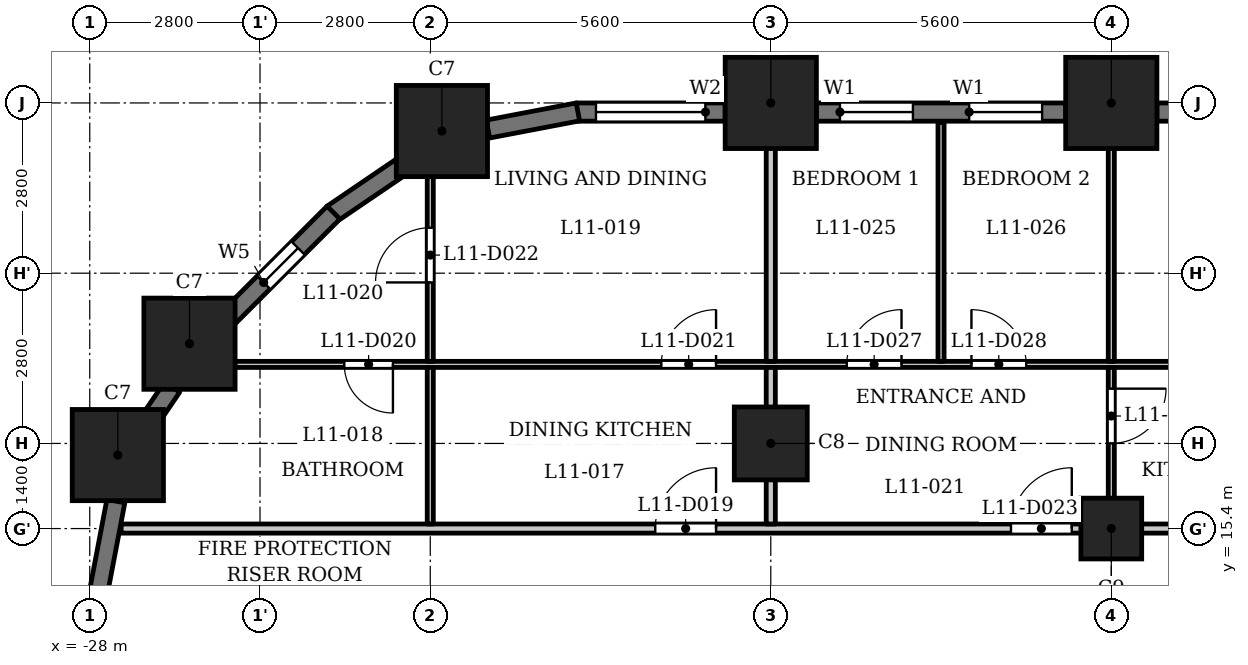
"""IFC4 building model, lengths in metres.
Left out: names, types, materials, properties, quantities, classifications, styles, units other than length and angle.
Written with IfcOpenShell. Run it as: python <this file> out.ifc"""

import sys

from ifc_helpers import new_model, si_unit, direction, frame, frame_2d, origin, origin_2d, place, context, subcontext, project, spatial, rectangle, extrude, element, fill, save


model = new_model("IFC4")
c1 = context("Model", 3, precision=1e-05, world=origin(), true_north=direction((0.0, 1.0)))
c2 = subcontext(c1, "Body", "Model", "MODEL_VIEW")
j1 = project(units=[si_unit("LENGTHUNIT", "METRE"), si_unit("PLANEANGLEUNIT", "RADIAN")], contexts=[c1])
p1 = place(None, origin())
s1 = spatial("IfcSite", under=j1, at=p1, CompositionType="ELEMENT")
p2 = place(p1, origin())
s2 = spatial("IfcBuilding", under=s1, at=p2, CompositionType="ELEMENT")
p3 = place(p2, frame((0.0, 0.0, 48.0)))
s3 = spatial("IfcBuildingStorey", under=s2, at=p3, CompositionType="ELEMENT", Elevation=48.0)
for number, where, z_axis, x_axis in (
    (1, (-11.2, 22.4, 0.0), (0.0, 0.0, 1.0), (1.0, 0.0, 0.0)),
    (2, (-16.8, 22.4, 0.0), (0.0, 0.0, 1.0), (1.0, 0.0, 0.0)),
    (3, (-22.209, 21.938, 0.0), (0.0, 0.0, 1.0), (1.0, 0.0, 0.0)),
    (4, (-26.36, 18.44, 0.0), (0.0, 0.0, 1.0), (1.0, 0.0, 0.0)),
    (5, (-27.538, 16.609, 0.0), (0.0, 0.0, 1.0), (1.0, 0.0, 0.0)),
):
    element("IfcColumn", number, at=place(p3, frame(where, z_axis=z_axis, x_axis=x_axis)), inside=s3, PredefinedType="COLUMN", context=c2, shape_type="SweptSolid", body=[
        extrude(rectangle(XDim=1.5, YDim=1.5, at=origin_2d()), origin(), (0.0, 0.0, 1.0), 3.5),
    ])
p4 = place(p3, frame((-16.8, 16.8, 0.0), z_axis=(0.0, 0.0, 1.0), x_axis=(1.0, 0.0, 0.0)))
e6 = element("IfcColumn", 6, at=p4, inside=s3, PredefinedType="COLUMN", context=c2, shape_type="SweptSolid", body=[
    extrude(rectangle(XDim=1.2, YDim=1.2, at=origin_2d()), origin(), (0.0, 0.0, 1.0), 3.5),
])
p5 = place(p3, frame((-11.2, 15.4, 0.0), z_axis=(0.0, 0.0, 1.0), x_axis=(1.0, 0.0, 0.0)))
e7 = element("IfcColumn", 7, at=p5, inside=s3, PredefinedType="COLUMN", context=c2, shape_type="SweptSolid", body=[
    extrude(rectangle(XDim=1.0, YDim=1.0, at=origin_2d()), origin(), (0.0, 0.0, 1.0), 3.5),
])
p6 = place(p3, frame((-6.35, 22.25, 0.0), z_axis=(0.0, 0.0, 1.0), x_axis=(-1.0, 0.0, 0.0)))
e8 = element("IfcWall", 8, at=p6, inside=s3, PredefinedType="SOLIDWALL", context=c2, shape_type="SweptSolid", body=[
    extrude(rectangle(XDim=4.1, YDim=0.3, at=frame_2d((2.05, 0.0))), origin(), (0.0, 0.0, 1.0), 2.35),
])
p7 = place(p6, frame((0.75, 0.0, 0.9)))
e9 = element("IfcOpeningElement", 9, at=p7, cuts=e8, PredefinedType="OPENING", context=c2, shape_type="SweptSolid", body=[
    extrude(rectangle(XDim=2.6, YDim=1.25, at=frame_2d((1.3, 0.625))), frame((0.0, 0.16, 0.0), z_axis=(0.0, -1.0, 0.0), x_axis=(1.0, 0.0, 0.0)), (0.0, 0.0, 1.0), 0.32),
])
p8 = place(p3, frame((-11.95, 22.25, 0.0), z_axis=(0.0, 0.0, 1.0), x_axis=(-1.0, 0.0, 0.0)))
e10 = element("IfcWall", 10, at=p8, inside=s3, PredefinedType="SOLIDWALL", context=c2, shape_type="SweptSolid", body=[
    extrude(rectangle(XDim=4.1, YDim=0.3, at=frame_2d((2.05, 0.0))), origin(), (0.0, 0.0, 1.0), 2.35),
])
p9 = place(p8, frame((0.387, 0.0, 0.6)))
e11 = element("IfcOpeningElement", 11, at=p9, cuts=e10, PredefinedType="OPENING", context=c2, shape_type="SweptSolid", body=[
    extrude(rectangle(XDim=1.2, YDim=1.55, at=frame_2d((0.6, 0.775))), frame((0.0, 0.16, 0.0), z_axis=(0.0, -1.0, 0.0), x_axis=(1.0, 0.0, 0.0)), (0.0, 0.0, 1.0), 0.32),
])
p10 = place(p8, frame((2.512, 0.0, 0.6)))
e12 = element("IfcOpeningElement", 12, at=p10, cuts=e10, PredefinedType="OPENING", context=c2, shape_type="SweptSolid", body=[
    extrude(rectangle(XDim=1.2, YDim=1.55, at=frame_2d((0.6, 0.775))), frame((0.0, 0.16, 0.0), z_axis=(0.0, -1.0, 0.0), x_axis=(1.0, 0.0, 0.0)), (0.0, 0.0, 1.0), 0.32),
])
p11 = place(p3, frame((-17.55, 22.25, 0.0), z_axis=(0.0, 0.0, 1.0), x_axis=(-1.0, 0.0, 0.0)))
e13 = element("IfcWall", 13, at=p11, inside=s3, PredefinedType="SOLIDWALL", context=c2, shape_type="SweptSolid", body=[
    extrude(rectangle(XDim=2.45, YDim=0.3, at=frame_2d((1.225, 0.0))), origin(), (0.0, 0.0, 1.0), 2.35),
])
p12 = place(p11, frame((0.325, 0.0, 0.9)))
e14 = element("IfcOpeningElement", 14, at=p12, cuts=e13, PredefinedType="OPENING", context=c2, shape_type="SweptSolid", body=[
    extrude(rectangle(XDim=1.8, YDim=1.25, at=frame_2d((0.9, 0.625))), frame((0.0, 0.16, 0.0), z_axis=(0.0, -1.0, 0.0), x_axis=(1.0, 0.0, 0.0)), (0.0, 0.0, 1.0), 0.32),
])
for number, where, z_axis, x_axis in (
    (15, (-19.972, 22.253, 0.0), (0.0, 0.0, 1.0), (-0.982, -0.187, 0.0)),
    (16, (-22.767, 21.426, 0.0), (0.0, 0.0, 1.0), (-0.827, -0.562, 0.0)),
):
    element("IfcWall", number, at=place(p3, frame(where, z_axis=z_axis, x_axis=x_axis)), inside=s3, PredefinedType="SOLIDWALL", context=c2, shape_type="SweptSolid", body=[
        extrude(rectangle(XDim=1.506, YDim=0.3, at=frame_2d((0.753, 0.0))), origin(), (0.0, 0.0, 1.0), 2.35),
    ])
p13 = place(p3, frame((-23.991, 20.597, 0.0), z_axis=(0.0, 0.0, 1.0), x_axis=(-0.707106781187, -0.707106781187, 0.0)))
e17 = element("IfcWall", 17, at=p13, inside=s3, PredefinedType="SOLIDWALL", context=c2, shape_type="SweptSolid", body=[
    extrude(rectangle(XDim=2.45, YDim=0.3, at=frame_2d((1.225, 0.0))), origin(), (0.0, 0.0, 1.0), 2.35),
])
p14 = place(p13, frame((0.825, 0.0, 0.6)))
e18 = element("IfcOpeningElement", 18, at=p14, cuts=e17, PredefinedType="OPENING", context=c2, shape_type="SweptSolid", body=[
    extrude(rectangle(XDim=0.8, YDim=1.55, at=frame_2d((0.4, 0.775))), frame((0.0, 0.16, 0.0), z_axis=(0.0, -1.0, 0.0), x_axis=(1.0, 0.0, 0.0)), (0.0, 0.0, 1.0), 0.32),
])
p15 = place(p3, frame((-26.645, 17.727, 0.0), z_axis=(0.0, 0.0, 1.0), x_axis=(-0.562083182981, -0.827080706709, 0.0)))
e19 = element("IfcWall", 19, at=p15, inside=s3, PredefinedType="SOLIDWALL", context=c2, shape_type="SweptSolid", body=[
    extrude(rectangle(XDim=0.677, YDim=0.3, at=frame_2d((0.339, 0.0))), origin(), (0.0, 0.0, 1.0), 3.2),
])
p16 = place(p3, frame((-27.571, 15.851, 0.0), z_axis=(0.0, 0.0, 1.0), x_axis=(-0.187223837635, -0.982317277982, 0.0)))
e20 = element("IfcWall", 20, at=p16, inside=s3, PredefinedType="SOLIDWALL", context=c2, shape_type="SweptSolid", body=[
    extrude(rectangle(XDim=1.506, YDim=0.3, at=frame_2d((0.753, 0.0))), origin(), (0.0, 0.0, 1.0), 2.35),
])
p17 = place(p3, frame((-27.484, 15.4, 0.0), z_axis=(0.0, 0.0, 1.0), x_axis=(1.0, 0.0, 0.0)))
e21 = element("IfcWall", 21, at=p17, inside=s3, PredefinedType="PARTITIONING", context=c2, shape_type="SweptSolid", body=[
    extrude(rectangle(XDim=54.968, YDim=0.15, at=frame_2d((27.484, 0.0))), origin(), (0.0, 0.0, 1.0), 3.2),
])
p18 = place(p17, frame((8.784, 0.0, 0.0)))
e22 = element("IfcOpeningElement", 22, at=p18, cuts=e21, PredefinedType="OPENING", context=c2, shape_type="SweptSolid", body=[
    extrude(rectangle(XDim=1.0, YDim=2.1, at=frame_2d((0.5, 1.05))), frame((0.0, 0.085, 0.0), z_axis=(0.0, -1.0, 0.0), x_axis=(1.0, 0.0, 0.0)), (0.0, 0.0, 1.0), 0.17),
])
p19 = place(p17, frame((14.634, 0.0, 0.0)))
e23 = element("IfcOpeningElement", 23, at=p19, cuts=e21, PredefinedType="OPENING", context=c2, shape_type="SweptSolid", body=[
    extrude(rectangle(XDim=1.0, YDim=2.1, at=frame_2d((0.5, 1.05))), frame((0.0, 0.085, 0.0), z_axis=(0.0, -1.0, 0.0), x_axis=(1.0, 0.0, 0.0)), (0.0, 0.0, 1.0), 0.17),
])
p20 = place(p17, frame((25.834, 0.0, 0.0)))
e24 = element("IfcOpeningElement", 24, at=p20, cuts=e21, PredefinedType="OPENING", context=c2, shape_type="SweptSolid", body=[
    extrude(rectangle(XDim=1.0, YDim=2.1, at=frame_2d((0.5, 1.05))), frame((0.0, 0.085, 0.0), z_axis=(0.0, -1.0, 0.0), x_axis=(1.0, 0.0, 0.0)), (0.0, 0.0, 1.0), 0.17),
])
p21 = place(p17, frame((30.184, 0.0, 0.0)))
e25 = element("IfcOpeningElement", 25, at=p21, cuts=e21, PredefinedType="OPENING", context=c2, shape_type="SweptSolid", body=[
    extrude(rectangle(XDim=1.0, YDim=2.1, at=frame_2d((0.5, 1.05))), frame((0.0, 0.085, 0.0), z_axis=(0.0, -1.0, 0.0), x_axis=(1.0, 0.0, 0.0)), (0.0, 0.0, 1.0), 0.17),
])
p22 = place(p17, frame((37.034, 0.0, 0.0)))
e26 = element("IfcOpeningElement", 26, at=p22, cuts=e21, PredefinedType="OPENING", context=c2, shape_type="SweptSolid", body=[
    extrude(rectangle(XDim=1.0, YDim=2.1, at=frame_2d((0.5, 1.05))), frame((0.0, 0.085, 0.0), z_axis=(0.0, -1.0, 0.0), x_axis=(1.0, 0.0, 0.0)), (0.0, 0.0, 1.0), 0.17),
])
p23 = place(p17, frame((48.234, 0.0, 0.0)))
e27 = element("IfcOpeningElement", 27, at=p23, cuts=e21, PredefinedType="OPENING", context=c2, shape_type="SweptSolid", body=[
    extrude(rectangle(XDim=1.0, YDim=2.1, at=frame_2d((0.5, 1.05))), frame((0.0, 0.085, 0.0), z_axis=(0.0, -1.0, 0.0), x_axis=(1.0, 0.0, 0.0)), (0.0, 0.0, 1.0), 0.17),
])
p24 = place(p3, frame((-26.44, 18.1, 0.0), z_axis=(0.0, 0.0, 1.0), x_axis=(1.0, 0.0, 0.0)))
e28 = element("IfcWall", 28, at=p24, inside=s3, PredefinedType="PARTITIONING", context=c2, shape_type="SweptSolid", body=[
    extrude(rectangle(XDim=52.63, YDim=0.1, at=frame_2d((26.315, 0.0))), origin(), (0.0, 0.0, 1.0), 3.2),
])
p25 = place(p24, frame((2.626, 0.0, 0.0)))
e29 = element("IfcOpeningElement", 29, at=p25, cuts=e28, PredefinedType="OPENING", context=c2, shape_type="SweptSolid", body=[
    extrude(rectangle(XDim=0.8, YDim=2.1, at=frame_2d((0.4, 1.05))), frame((0.0, 0.06, 0.0), z_axis=(0.0, -1.0, 0.0), x_axis=(1.0, 0.0, 0.0)), (0.0, 0.0, 1.0), 0.12),
])
p26 = place(p24, frame((7.84, 0.0, 0.0)))
e30 = element("IfcOpeningElement", 30, at=p26, cuts=e28, PredefinedType="OPENING", context=c2, shape_type="SweptSolid", body=[
    extrude(rectangle(XDim=0.9, YDim=2.1, at=frame_2d((0.45, 1.05))), frame((0.0, 0.06, 0.0), z_axis=(0.0, -1.0, 0.0), x_axis=(1.0, 0.0, 0.0)), (0.0, 0.0, 1.0), 0.12),
])
p27 = place(p24, frame((18.49, 0.0, 0.0)))
e31 = element("IfcOpeningElement", 31, at=p27, cuts=e28, PredefinedType="OPENING", context=c2, shape_type="SweptSolid", body=[
    extrude(rectangle(XDim=0.8, YDim=2.1, at=frame_2d((0.4, 1.05))), frame((0.0, 0.06, 0.0), z_axis=(0.0, -1.0, 0.0), x_axis=(1.0, 0.0, 0.0)), (0.0, 0.0, 1.0), 0.12),
])
p28 = place(p24, frame((16.54, 0.0, 0.0)))
e32 = element("IfcOpeningElement", 32, at=p28, cuts=e28, PredefinedType="OPENING", context=c2, shape_type="SweptSolid", body=[
    extrude(rectangle(XDim=0.9, YDim=2.1, at=frame_2d((0.45, 1.05))), frame((0.0, 0.06, 0.0), z_axis=(0.0, -1.0, 0.0), x_axis=(1.0, 0.0, 0.0)), (0.0, 0.0, 1.0), 0.12),
])
p29 = place(p24, frame((10.89, 0.0, 0.0)))
e33 = element("IfcOpeningElement", 33, at=p29, cuts=e28, PredefinedType="OPENING", context=c2, shape_type="SweptSolid", body=[
    extrude(rectangle(XDim=0.9, YDim=2.1, at=frame_2d((0.45, 1.05))), frame((0.0, 0.06, 0.0), z_axis=(0.0, -1.0, 0.0), x_axis=(1.0, 0.0, 0.0)), (0.0, 0.0, 1.0), 0.12),
])
p30 = place(p24, frame((12.94, 0.0, 0.0)))
e34 = element("IfcOpeningElement", 34, at=p30, cuts=e28, PredefinedType="OPENING", context=c2, shape_type="SweptSolid", body=[
    extrude(rectangle(XDim=0.9, YDim=2.1, at=frame_2d((0.45, 1.05))), frame((0.0, 0.06, 0.0), z_axis=(0.0, -1.0, 0.0), x_axis=(1.0, 0.0, 0.0)), (0.0, 0.0, 1.0), 0.12),
])
p31 = place(p24, frame((21.49, 0.0, 0.0)))
e35 = element("IfcOpeningElement", 35, at=p31, cuts=e28, PredefinedType="OPENING", context=c2, shape_type="SweptSolid", body=[
    extrude(rectangle(XDim=0.8, YDim=2.1, at=frame_2d((0.4, 1.05))), frame((0.0, 0.06, 0.0), z_axis=(0.0, -1.0, 0.0), x_axis=(1.0, 0.0, 0.0)), (0.0, 0.0, 1.0), 0.12),
])
p32 = place(p24, frame((24.89, 0.0, 0.0)))
e36 = element("IfcOpeningElement", 36, at=p32, cuts=e28, PredefinedType="OPENING", context=c2, shape_type="SweptSolid", body=[
    extrude(rectangle(XDim=0.9, YDim=2.1, at=frame_2d((0.45, 1.05))), frame((0.0, 0.06, 0.0), z_axis=(0.0, -1.0, 0.0), x_axis=(1.0, 0.0, 0.0)), (0.0, 0.0, 1.0), 0.12),
])
p33 = place(p24, frame((27.09, 0.0, 0.0)))
e37 = element("IfcOpeningElement", 37, at=p33, cuts=e28, PredefinedType="OPENING", context=c2, shape_type="SweptSolid", body=[
    extrude(rectangle(XDim=0.8, YDim=2.1, at=frame_2d((0.4, 1.05))), frame((0.0, 0.06, 0.0), z_axis=(0.0, -1.0, 0.0), x_axis=(1.0, 0.0, 0.0)), (0.0, 0.0, 1.0), 0.12),
])
p34 = place(p24, frame((28.99, 0.0, 0.0)))
e38 = element("IfcOpeningElement", 38, at=p34, cuts=e28, PredefinedType="OPENING", context=c2, shape_type="SweptSolid", body=[
    extrude(rectangle(XDim=0.9, YDim=2.1, at=frame_2d((0.45, 1.05))), frame((0.0, 0.06, 0.0), z_axis=(0.0, -1.0, 0.0), x_axis=(1.0, 0.0, 0.0)), (0.0, 0.0, 1.0), 0.12),
])
p35 = place(p24, frame((41.69, 0.0, 0.0)))
e39 = element("IfcOpeningElement", 39, at=p35, cuts=e28, PredefinedType="OPENING", context=c2, shape_type="SweptSolid", body=[
    extrude(rectangle(XDim=0.8, YDim=2.1, at=frame_2d((0.4, 1.05))), frame((0.0, 0.06, 0.0), z_axis=(0.0, -1.0, 0.0), x_axis=(1.0, 0.0, 0.0)), (0.0, 0.0, 1.0), 0.12),
])
p36 = place(p24, frame((38.99, 0.0, 0.0)))
e40 = element("IfcOpeningElement", 40, at=p36, cuts=e28, PredefinedType="OPENING", context=c2, shape_type="SweptSolid", body=[
    extrude(rectangle(XDim=0.9, YDim=2.1, at=frame_2d((0.45, 1.05))), frame((0.0, 0.06, 0.0), z_axis=(0.0, -1.0, 0.0), x_axis=(1.0, 0.0, 0.0)), (0.0, 0.0, 1.0), 0.12),
])
p37 = place(p24, frame((33.29, 0.0, 0.0)))
e41 = element("IfcOpeningElement", 41, at=p37, cuts=e28, PredefinedType="OPENING", context=c2, shape_type="SweptSolid", body=[
    extrude(rectangle(XDim=0.9, YDim=2.1, at=frame_2d((0.45, 1.05))), frame((0.0, 0.06, 0.0), z_axis=(0.0, -1.0, 0.0), x_axis=(1.0, 0.0, 0.0)), (0.0, 0.0, 1.0), 0.12),
])
p38 = place(p24, frame((35.34, 0.0, 0.0)))
e42 = element("IfcOpeningElement", 42, at=p38, cuts=e28, PredefinedType="OPENING", context=c2, shape_type="SweptSolid", body=[
    extrude(rectangle(XDim=0.9, YDim=2.1, at=frame_2d((0.45, 1.05))), frame((0.0, 0.06, 0.0), z_axis=(0.0, -1.0, 0.0), x_axis=(1.0, 0.0, 0.0)), (0.0, 0.0, 1.0), 0.12),
])
p39 = place(p24, frame((50.74, 0.0, 0.0)))
e43 = element("IfcOpeningElement", 43, at=p39, cuts=e28, PredefinedType="OPENING", context=c2, shape_type="SweptSolid", body=[
    extrude(rectangle(XDim=0.8, YDim=2.1, at=frame_2d((0.4, 1.05))), frame((0.0, 0.06, 0.0), z_axis=(0.0, -1.0, 0.0), x_axis=(1.0, 0.0, 0.0)), (0.0, 0.0, 1.0), 0.12),
])
p40 = place(p24, frame((47.29, 0.0, 0.0)))
e44 = element("IfcOpeningElement", 44, at=p40, cuts=e28, PredefinedType="OPENING", context=c2, shape_type="SweptSolid", body=[
    extrude(rectangle(XDim=0.9, YDim=2.1, at=frame_2d((0.45, 1.05))), frame((0.0, 0.06, 0.0), z_axis=(0.0, -1.0, 0.0), x_axis=(1.0, 0.0, 0.0)), (0.0, 0.0, 1.0), 0.12),
])
p41 = place(p3, frame((-22.4, 15.475, 0.0), z_axis=(0.0, 0.0, 1.0), x_axis=(0.0, 1.0, 0.0)))
e45 = element("IfcWall", 45, at=p41, inside=s3, PredefinedType="PARTITIONING", context=c2, shape_type="SweptSolid", body=[
    extrude(rectangle(XDim=2.575, YDim=0.1, at=frame_2d((1.288, 0.0))), origin(), (0.0, 0.0, 1.0), 3.2),
])
p42 = place(p3, frame((-22.4, 18.15, 0.0), z_axis=(0.0, 0.0, 1.0), x_axis=(0.0, 1.0, 0.0)))
e46 = element("IfcWall", 46, at=p42, inside=s3, PredefinedType="PARTITIONING", context=c2, shape_type="SweptSolid", body=[
    extrude(rectangle(XDim=3.57, YDim=0.1, at=frame_2d((1.785, 0.0))), origin(), (0.0, 0.0, 1.0), 3.2),
])
p43 = place(p42, frame((1.298, 0.0, 0.0)))
e47 = element("IfcOpeningElement", 47, at=p43, cuts=e46, PredefinedType="OPENING", context=c2, shape_type="SweptSolid", body=[
    extrude(rectangle(XDim=0.9, YDim=2.1, at=frame_2d((0.45, 1.05))), frame((0.0, 0.06, 0.0), z_axis=(0.0, -1.0, 0.0), x_axis=(1.0, 0.0, 0.0)), (0.0, 0.0, 1.0), 0.12),
])
p44 = place(p3, frame((-16.8, 15.475, 0.0), z_axis=(0.0, 0.0, 1.0), x_axis=(0.0, 1.0, 0.0)))
e48 = element("IfcWall", 48, at=p44, inside=s3, PredefinedType="PARTITIONING", context=c2, shape_type="SweptSolid", body=[
    extrude(rectangle(XDim=2.575, YDim=0.15, at=frame_2d((1.288, 0.0))), origin(), (0.0, 0.0, 1.0), 3.2),
])
p45 = place(p3, frame((-16.8, 18.15, 0.0), z_axis=(0.0, 0.0, 1.0), x_axis=(0.0, 1.0, 0.0)))
e49 = element("IfcWall", 49, at=p45, inside=s3, PredefinedType="PARTITIONING", context=c2, shape_type="SweptSolid", body=[
    extrude(rectangle(XDim=4.98, YDim=0.15, at=frame_2d((2.49, 0.0))), origin(), (0.0, 0.0, 1.0), 3.2),
])
p46 = place(p3, frame((-14.0, 18.15, 0.0), z_axis=(0.0, 0.0, 1.0), x_axis=(0.0, 1.0, 0.0)))
e50 = element("IfcWall", 50, at=p46, inside=s3, PredefinedType="PARTITIONING", context=c2, shape_type="SweptSolid", body=[
    extrude(rectangle(XDim=3.93, YDim=0.1, at=frame_2d((1.965, 0.0))), origin(), (0.0, 0.0, 1.0), 3.2),
])
p47 = place(p3, frame((-11.2, 15.475, 0.0), z_axis=(0.0, 0.0, 1.0), x_axis=(0.0, 1.0, 0.0)))
e51 = element("IfcWall", 51, at=p47, inside=s3, PredefinedType="PARTITIONING", context=c2, shape_type="SweptSolid", body=[
    extrude(rectangle(XDim=2.575, YDim=0.1, at=frame_2d((1.288, 0.0))), origin(), (0.0, 0.0, 1.0), 3.2),
])
p48 = place(p47, frame((1.326, 0.0, 0.0)))
e52 = element("IfcOpeningElement", 52, at=p48, cuts=e51, PredefinedType="OPENING", context=c2, shape_type="SweptSolid", body=[
    extrude(rectangle(XDim=0.9, YDim=2.1, at=frame_2d((0.45, 1.05))), frame((0.0, 0.06, 0.0), z_axis=(0.0, -1.0, 0.0), x_axis=(1.0, 0.0, 0.0)), (0.0, 0.0, 1.0), 0.12),
])
p49 = place(p3, frame((-11.2, 18.15, 0.0), z_axis=(0.0, 0.0, 1.0), x_axis=(0.0, 1.0, 0.0)))
e53 = element("IfcWall", 53, at=p49, inside=s3, PredefinedType="PARTITIONING", context=c2, shape_type="SweptSolid", body=[
    extrude(rectangle(XDim=4.98, YDim=0.1, at=frame_2d((2.49, 0.0))), origin(), (0.0, 0.0, 1.0), 3.2),
])
p50 = place(p18, origin())
e54 = element("IfcDoor", 54, at=p50, inside=s3, OperationType="SINGLE_SWING_LEFT", PredefinedType="DOOR", context=c2, shape_type="SweptSolid", body=[
    extrude(rectangle(XDim=1.0, YDim=2.1, at=frame_2d((0.5, 1.05))), frame((0.0, 0.025, 0.0), z_axis=(0.0, -1.0, 0.0), x_axis=(1.0, 0.0, 0.0)), (0.0, 0.0, 1.0), 0.05),
])
fill(e22, e54)
p51 = place(p25, origin())
e55 = element("IfcDoor", 55, at=p51, inside=s3, OperationType="SINGLE_SWING_RIGHT", PredefinedType="DOOR", context=c2, shape_type="SweptSolid", body=[
    extrude(rectangle(XDim=0.8, YDim=2.1, at=frame_2d((0.4, 1.05))), frame((0.0, 0.025, 0.0), z_axis=(0.0, -1.0, 0.0), x_axis=(1.0, 0.0, 0.0)), (0.0, 0.0, 1.0), 0.05),
])
fill(e29, e55)
p52 = place(p26, origin())
e56 = element("IfcDoor", 56, at=p52, inside=s3, OperationType="SINGLE_SWING_LEFT", PredefinedType="DOOR", context=c2, shape_type="SweptSolid", body=[
    extrude(rectangle(XDim=0.9, YDim=2.1, at=frame_2d((0.45, 1.05))), frame((0.0, 0.025, 0.0), z_axis=(0.0, -1.0, 0.0), x_axis=(1.0, 0.0, 0.0)), (0.0, 0.0, 1.0), 0.05),
])
fill(e30, e56)
p53 = place(p43, origin())
e57 = element("IfcDoor", 57, at=p53, inside=s3, OperationType="SINGLE_SWING_RIGHT", PredefinedType="DOOR", context=c2, shape_type="SweptSolid", body=[
    extrude(rectangle(XDim=0.9, YDim=2.1, at=frame_2d((0.45, 1.05))), frame((0.0, 0.025, 0.0), z_axis=(0.0, -1.0, 0.0), x_axis=(1.0, 0.0, 0.0)), (0.0, 0.0, 1.0), 0.05),
])
fill(e47, e57)
p54 = place(p19, origin())
e58 = element("IfcDoor", 58, at=p54, inside=s3, OperationType="SINGLE_SWING_LEFT", PredefinedType="DOOR", context=c2, shape_type="SweptSolid", body=[
    extrude(rectangle(XDim=1.0, YDim=2.1, at=frame_2d((0.5, 1.05))), frame((0.0, 0.025, 0.0), z_axis=(0.0, -1.0, 0.0), x_axis=(1.0, 0.0, 0.0)), (0.0, 0.0, 1.0), 0.05),
])
fill(e23, e58)
p55 = place(p48, origin())
e59 = element("IfcDoor", 59, at=p55, inside=s3, OperationType="SINGLE_SWING_RIGHT", PredefinedType="DOOR", context=c2, shape_type="SweptSolid", body=[
    extrude(rectangle(XDim=0.9, YDim=2.1, at=frame_2d((0.45, 1.05))), frame((0.0, 0.025, 0.0), z_axis=(0.0, -1.0, 0.0), x_axis=(1.0, 0.0, 0.0)), (0.0, 0.0, 1.0), 0.05),
])
fill(e52, e59)
p56 = place(p29, origin())
e60 = element("IfcDoor", 60, at=p56, inside=s3, OperationType="SINGLE_SWING_LEFT", PredefinedType="DOOR", context=c2, shape_type="SweptSolid", body=[
    extrude(rectangle(XDim=0.9, YDim=2.1, at=frame_2d((0.45, 1.05))), frame((0.0, 0.025, 0.0), z_axis=(0.0, -1.0, 0.0), x_axis=(1.0, 0.0, 0.0)), (0.0, 0.0, 1.0), 0.05),
])
fill(e33, e60)
p57 = place(p30, origin())
e61 = element("IfcDoor", 61, at=p57, inside=s3, OperationType="SINGLE_SWING_RIGHT", PredefinedType="DOOR", context=c2, shape_type="SweptSolid", body=[
    extrude(rectangle(XDim=0.9, YDim=2.1, at=frame_2d((0.45, 1.05))), frame((0.0, 0.025, 0.0), z_axis=(0.0, -1.0, 0.0), x_axis=(1.0, 0.0, 0.0)), (0.0, 0.0, 1.0), 0.05),
])
fill(e34, e61)
p58 = place(p9, origin())
e62 = element("IfcWindow", 62, at=p58, inside=s3, PartitioningType="SINGLE_PANEL", PredefinedType="WINDOW", context=c2, shape_type="SweptSolid", body=[
    extrude(rectangle(XDim=1.2, YDim=1.55, at=frame_2d((0.6, 0.775))), frame((0.0, 0.03, 0.0), z_axis=(0.0, -1.0, 0.0), x_axis=(1.0, 0.0, 0.0)), (0.0, 0.0, 1.0), 0.06),
])
fill(e11, e62)
p59 = place(p10, origin())
e63 = element("IfcWindow", 63, at=p59, inside=s3, PartitioningType="SINGLE_PANEL", PredefinedType="WINDOW", context=c2, shape_type="SweptSolid", body=[
    extrude(rectangle(XDim=1.2, YDim=1.55, at=frame_2d((0.6, 0.775))), frame((0.0, 0.03, 0.0), z_axis=(0.0, -1.0, 0.0), x_axis=(1.0, 0.0, 0.0)), (0.0, 0.0, 1.0), 0.06),
])
fill(e12, e63)
p60 = place(p12, origin())
e64 = element("IfcWindow", 64, at=p60, inside=s3, PartitioningType="SINGLE_PANEL", PredefinedType="WINDOW", context=c2, shape_type="SweptSolid", body=[
    extrude(rectangle(XDim=1.8, YDim=1.25, at=frame_2d((0.9, 0.625))), frame((0.0, 0.03, 0.0), z_axis=(0.0, -1.0, 0.0), x_axis=(1.0, 0.0, 0.0)), (0.0, 0.0, 1.0), 0.06),
])
fill(e14, e64)
p61 = place(p14, origin())
e65 = element("IfcWindow", 65, at=p61, inside=s3, PartitioningType="SINGLE_PANEL", PredefinedType="WINDOW", context=c2, shape_type="SweptSolid", body=[
    extrude(rectangle(XDim=0.8, YDim=1.55, at=frame_2d((0.4, 0.775))), frame((0.0, 0.03, 0.0), z_axis=(0.0, -1.0, 0.0), x_axis=(1.0, 0.0, 0.0)), (0.0, 0.0, 1.0), 0.06),
])
fill(e18, e65)
save(model, sys.argv[1])
